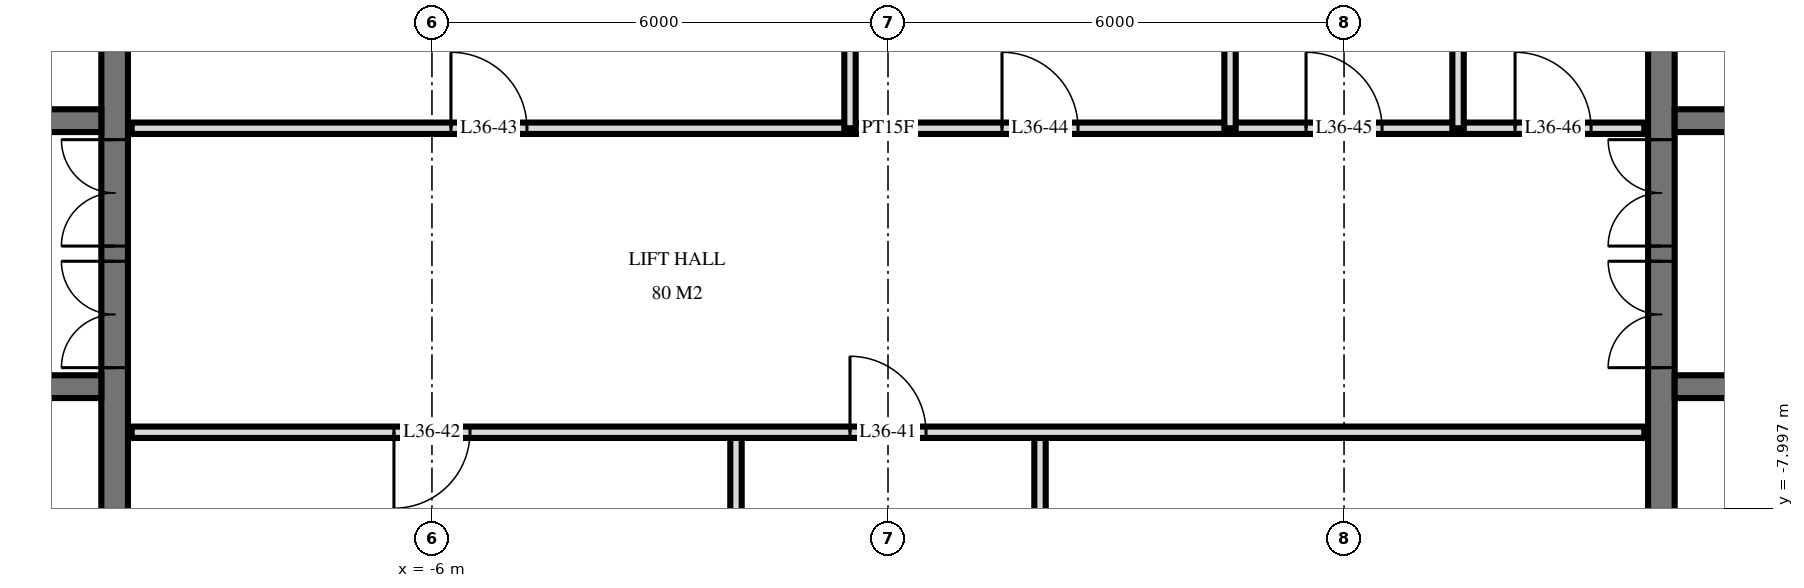
"""IFC4 building model, lengths in metres.
Left out: names, types, materials, properties, quantities, classifications, styles, units other than length and angle.
Written with IfcOpenShell. Run it as: python <this file> out.ifc"""

import sys

from ifc_helpers import new_model, si_unit, direction, frame, frame_2d, origin, place, context, subcontext, project, spatial, rectangle, extrude, element, fill, save


model = new_model("IFC4")
c1 = context("Model", 3, precision=1e-05, world=origin(), true_north=direction((0.0, 1.0)))
c2 = subcontext(c1, "Body", "Model", "MODEL_VIEW")
j1 = project(units=[si_unit("LENGTHUNIT", "METRE"), si_unit("PLANEANGLEUNIT", "RADIAN")], contexts=[c1])
p1 = place(None, origin())
s1 = spatial("IfcSite", under=j1, at=p1, CompositionType="ELEMENT")
p2 = place(p1, origin())
s2 = spatial("IfcBuilding", under=s1, at=p2, CompositionType="ELEMENT")
p3 = place(p2, frame((0.0, 0.0, 141.6)))
s3 = spatial("IfcBuildingStorey", under=s2, at=p3, CompositionType="ELEMENT", Elevation=141.6)
p4 = place(p3, frame((-10.175, -14.55, 0.0), z_axis=(0.0, 0.0, 1.0), x_axis=(0.0, 1.0, 0.0)))
e1 = element("IfcWall", 1, at=p4, inside=s3, PredefinedType="SHEAR", context=c2, shape_type="SweptSolid", body=[
    extrude(rectangle(XDim=14.1, YDim=0.35, at=frame_2d((7.05, 0.0))), origin(), (0.0, 0.0, 1.0), 3.6),
])
p5 = place(p4, frame((8.4, 0.0, 0.0)))
e2 = element("IfcOpeningElement", 2, at=p5, cuts=e1, PredefinedType="OPENING", context=c2, shape_type="SweptSolid", body=[
    extrude(rectangle(XDim=1.4, YDim=2.4, at=frame_2d((0.7, 1.2))), frame((0.0, 0.185, 0.0), z_axis=(0.0, -1.0, 0.0), x_axis=(1.0, 0.0, 0.0)), (0.0, 0.0, 1.0), 0.37),
])
p6 = place(p4, frame((10.0, 0.0, 0.0)))
e3 = element("IfcOpeningElement", 3, at=p6, cuts=e1, PredefinedType="OPENING", context=c2, shape_type="SweptSolid", body=[
    extrude(rectangle(XDim=1.4, YDim=2.4, at=frame_2d((0.7, 1.2))), frame((0.0, 0.185, 0.0), z_axis=(0.0, -1.0, 0.0), x_axis=(1.0, 0.0, 0.0)), (0.0, 0.0, 1.0), 0.37),
])
p7 = place(p4, frame((4.0, 0.0, 0.0)))
e4 = element("IfcOpeningElement", 4, at=p7, cuts=e1, PredefinedType="OPENING", context=c2, shape_type="SweptSolid", body=[
    extrude(rectangle(XDim=1.2, YDim=2.1, at=frame_2d((0.6, 1.05))), frame((0.0, 0.185, 0.0), z_axis=(0.0, -1.0, 0.0), x_axis=(1.0, 0.0, 0.0)), (0.0, 0.0, 1.0), 0.37),
])
p8 = place(p3, frame((-24.05, -2.9, 0.0), z_axis=(0.0, 0.0, 1.0), x_axis=(1.0, 0.0, 0.0)))
e5 = element("IfcWall", 5, at=p8, inside=s3, PredefinedType="SHEAR", context=c2, shape_type="SweptSolid", body=[
    extrude(rectangle(XDim=13.7, YDim=0.3, at=frame_2d((6.85, 0.0))), origin(), (0.0, 0.0, 1.0), 3.6),
])
p9 = place(p8, frame((0.55, 0.0, 0.0)))
e6 = element("IfcOpeningElement", 6, at=p9, cuts=e5, PredefinedType="OPENING", context=c2, shape_type="SweptSolid", body=[
    extrude(rectangle(XDim=1.1, YDim=2.1, at=frame_2d((0.55, 1.05))), frame((0.0, 0.16, 0.0), z_axis=(0.0, -1.0, 0.0), x_axis=(1.0, 0.0, 0.0)), (0.0, 0.0, 1.0), 0.32),
])
p10 = place(p8, frame((5.9, 0.0, 0.0)))
e7 = element("IfcOpeningElement", 7, at=p10, cuts=e5, PredefinedType="OPENING", context=c2, shape_type="SweptSolid", body=[
    extrude(rectangle(XDim=0.9, YDim=2.1, at=frame_2d((0.45, 1.05))), frame((0.0, 0.16, 0.0), z_axis=(0.0, -1.0, 0.0), x_axis=(1.0, 0.0, 0.0)), (0.0, 0.0, 1.0), 0.32),
])
p11 = place(p8, frame((11.85, 0.0, 0.0)))
e8 = element("IfcOpeningElement", 8, at=p11, cuts=e5, PredefinedType="OPENING", context=c2, shape_type="SweptSolid", body=[
    extrude(rectangle(XDim=1.0, YDim=2.1, at=frame_2d((0.5, 1.05))), frame((0.0, 0.16, 0.0), z_axis=(0.0, -1.0, 0.0), x_axis=(1.0, 0.0, 0.0)), (0.0, 0.0, 1.0), 0.32),
])
p12 = place(p8, frame((8.85, 0.0, 0.0)))
e9 = element("IfcOpeningElement", 9, at=p12, cuts=e5, PredefinedType="OPENING", context=c2, shape_type="SweptSolid", body=[
    extrude(rectangle(XDim=1.0, YDim=2.1, at=frame_2d((0.5, 1.05))), frame((0.0, 0.16, 0.0), z_axis=(0.0, -1.0, 0.0), x_axis=(1.0, 0.0, 0.0)), (0.0, 0.0, 1.0), 0.32),
])
p13 = place(p8, frame((3.0, 0.0, 0.0)))
e10 = element("IfcOpeningElement", 10, at=p13, cuts=e5, PredefinedType="OPENING", context=c2, shape_type="SweptSolid", body=[
    extrude(rectangle(XDim=1.0, YDim=2.1, at=frame_2d((0.5, 1.05))), frame((0.0, 0.16, 0.0), z_axis=(0.0, -1.0, 0.0), x_axis=(1.0, 0.0, 0.0)), (0.0, 0.0, 1.0), 0.32),
])
p14 = place(p3, frame((-24.05, -6.4, 0.0), z_axis=(0.0, 0.0, 1.0), x_axis=(1.0, 0.0, 0.0)))
e11 = element("IfcWall", 11, at=p14, inside=s3, PredefinedType="SHEAR", context=c2, shape_type="SweptSolid", body=[
    extrude(rectangle(XDim=13.7, YDim=0.3, at=frame_2d((6.85, 0.0))), origin(), (0.0, 0.0, 1.0), 3.6),
])
p15 = place(p14, frame((0.55, 0.0, 0.0)))
e12 = element("IfcOpeningElement", 12, at=p15, cuts=e11, PredefinedType="OPENING", context=c2, shape_type="SweptSolid", body=[
    extrude(rectangle(XDim=1.1, YDim=2.1, at=frame_2d((0.55, 1.05))), frame((0.0, 0.16, 0.0), z_axis=(0.0, -1.0, 0.0), x_axis=(1.0, 0.0, 0.0)), (0.0, 0.0, 1.0), 0.32),
])
p16 = place(p14, frame((5.8, 0.0, 0.0)))
e13 = element("IfcOpeningElement", 13, at=p16, cuts=e11, PredefinedType="OPENING", context=c2, shape_type="SweptSolid", body=[
    extrude(rectangle(XDim=1.1, YDim=2.1, at=frame_2d((0.55, 1.05))), frame((0.0, 0.16, 0.0), z_axis=(0.0, -1.0, 0.0), x_axis=(1.0, 0.0, 0.0)), (0.0, 0.0, 1.0), 0.32),
])
p17 = place(p3, frame((10.175, -14.55, 0.0), z_axis=(0.0, 0.0, 1.0), x_axis=(0.0, 1.0, 0.0)))
e14 = element("IfcWall", 14, at=p17, inside=s3, PredefinedType="SHEAR", context=c2, shape_type="SweptSolid", body=[
    extrude(rectangle(XDim=14.1, YDim=0.35, at=frame_2d((7.05, 0.0))), origin(), (0.0, 0.0, 1.0), 3.6),
])
p18 = place(p17, frame((8.4, 0.0, 0.0)))
e15 = element("IfcOpeningElement", 15, at=p18, cuts=e14, PredefinedType="OPENING", context=c2, shape_type="SweptSolid", body=[
    extrude(rectangle(XDim=1.4, YDim=2.4, at=frame_2d((0.7, 1.2))), frame((0.0, 0.185, 0.0), z_axis=(0.0, -1.0, 0.0), x_axis=(1.0, 0.0, 0.0)), (0.0, 0.0, 1.0), 0.37),
])
p19 = place(p17, frame((10.0, 0.0, 0.0)))
e16 = element("IfcOpeningElement", 16, at=p19, cuts=e14, PredefinedType="OPENING", context=c2, shape_type="SweptSolid", body=[
    extrude(rectangle(XDim=1.4, YDim=2.4, at=frame_2d((0.7, 1.2))), frame((0.0, 0.185, 0.0), z_axis=(0.0, -1.0, 0.0), x_axis=(1.0, 0.0, 0.0)), (0.0, 0.0, 1.0), 0.37),
])
p20 = place(p17, frame((4.0, 0.0, 0.0)))
e17 = element("IfcOpeningElement", 17, at=p20, cuts=e14, PredefinedType="OPENING", context=c2, shape_type="SweptSolid", body=[
    extrude(rectangle(XDim=1.2, YDim=2.1, at=frame_2d((0.6, 1.05))), frame((0.0, 0.185, 0.0), z_axis=(0.0, -1.0, 0.0), x_axis=(1.0, 0.0, 0.0)), (0.0, 0.0, 1.0), 0.37),
])
p21 = place(p3, frame((10.35, -2.9, 0.0), z_axis=(0.0, 0.0, 1.0), x_axis=(1.0, 0.0, 0.0)))
e18 = element("IfcWall", 18, at=p21, inside=s3, PredefinedType="SHEAR", context=c2, shape_type="SweptSolid", body=[
    extrude(rectangle(XDim=13.7, YDim=0.3, at=frame_2d((6.85, 0.0))), origin(), (0.0, 0.0, 1.0), 3.6),
])
p22 = place(p21, frame((12.05, 0.0, 0.0)))
e19 = element("IfcOpeningElement", 19, at=p22, cuts=e18, PredefinedType="OPENING", context=c2, shape_type="SweptSolid", body=[
    extrude(rectangle(XDim=1.1, YDim=2.1, at=frame_2d((0.55, 1.05))), frame((0.0, 0.16, 0.0), z_axis=(0.0, -1.0, 0.0), x_axis=(1.0, 0.0, 0.0)), (0.0, 0.0, 1.0), 0.32),
])
p23 = place(p21, frame((6.9, 0.0, 0.0)))
e20 = element("IfcOpeningElement", 20, at=p23, cuts=e18, PredefinedType="OPENING", context=c2, shape_type="SweptSolid", body=[
    extrude(rectangle(XDim=0.9, YDim=2.1, at=frame_2d((0.45, 1.05))), frame((0.0, 0.16, 0.0), z_axis=(0.0, -1.0, 0.0), x_axis=(1.0, 0.0, 0.0)), (0.0, 0.0, 1.0), 0.32),
])
p24 = place(p21, frame((0.85, 0.0, 0.0)))
e21 = element("IfcOpeningElement", 21, at=p24, cuts=e18, PredefinedType="OPENING", context=c2, shape_type="SweptSolid", body=[
    extrude(rectangle(XDim=1.0, YDim=2.1, at=frame_2d((0.5, 1.05))), frame((0.0, 0.16, 0.0), z_axis=(0.0, -1.0, 0.0), x_axis=(1.0, 0.0, 0.0)), (0.0, 0.0, 1.0), 0.32),
])
p25 = place(p21, frame((3.85, 0.0, 0.0)))
e22 = element("IfcOpeningElement", 22, at=p25, cuts=e18, PredefinedType="OPENING", context=c2, shape_type="SweptSolid", body=[
    extrude(rectangle(XDim=1.0, YDim=2.1, at=frame_2d((0.5, 1.05))), frame((0.0, 0.16, 0.0), z_axis=(0.0, -1.0, 0.0), x_axis=(1.0, 0.0, 0.0)), (0.0, 0.0, 1.0), 0.32),
])
p26 = place(p21, frame((9.7, 0.0, 0.0)))
e23 = element("IfcOpeningElement", 23, at=p26, cuts=e18, PredefinedType="OPENING", context=c2, shape_type="SweptSolid", body=[
    extrude(rectangle(XDim=1.0, YDim=2.1, at=frame_2d((0.5, 1.05))), frame((0.0, 0.16, 0.0), z_axis=(0.0, -1.0, 0.0), x_axis=(1.0, 0.0, 0.0)), (0.0, 0.0, 1.0), 0.32),
])
p27 = place(p3, frame((10.35, -6.4, 0.0), z_axis=(0.0, 0.0, 1.0), x_axis=(1.0, 0.0, 0.0)))
e24 = element("IfcWall", 24, at=p27, inside=s3, PredefinedType="SHEAR", context=c2, shape_type="SweptSolid", body=[
    extrude(rectangle(XDim=13.7, YDim=0.3, at=frame_2d((6.85, 0.0))), origin(), (0.0, 0.0, 1.0), 3.6),
])
p28 = place(p27, frame((12.05, 0.0, 0.0)))
e25 = element("IfcOpeningElement", 25, at=p28, cuts=e24, PredefinedType="OPENING", context=c2, shape_type="SweptSolid", body=[
    extrude(rectangle(XDim=1.1, YDim=2.1, at=frame_2d((0.55, 1.05))), frame((0.0, 0.16, 0.0), z_axis=(0.0, -1.0, 0.0), x_axis=(1.0, 0.0, 0.0)), (0.0, 0.0, 1.0), 0.32),
])
p29 = place(p27, frame((6.8, 0.0, 0.0)))
e26 = element("IfcOpeningElement", 26, at=p29, cuts=e24, PredefinedType="OPENING", context=c2, shape_type="SweptSolid", body=[
    extrude(rectangle(XDim=1.1, YDim=2.1, at=frame_2d((0.55, 1.05))), frame((0.0, 0.16, 0.0), z_axis=(0.0, -1.0, 0.0), x_axis=(1.0, 0.0, 0.0)), (0.0, 0.0, 1.0), 0.32),
])
for number, where, z_axis, x_axis in (
    (27, (7.5, -3.0, 0.0), (0.0, 0.0, 1.0), (0.0, 1.0, 0.0)),
    (28, (4.5, -3.0, 0.0), (0.0, 0.0, 1.0), (0.0, 1.0, 0.0)),
):
    element("IfcWall", number, at=place(p3, frame(where, z_axis=z_axis, x_axis=x_axis)), inside=s3, PredefinedType="PLUMBINGWALL", context=c2, shape_type="SweptSolid", body=[
        extrude(rectangle(XDim=4.02, YDim=0.15, at=frame_2d((2.01, 0.0))), origin(), (0.0, 0.0, 1.0), 3.32),
    ])
p30 = place(p3, frame((2.0, -11.0, 0.0), z_axis=(0.0, 0.0, 1.0), x_axis=(0.0, 1.0, 0.0)))
e29 = element("IfcWall", 29, at=p30, inside=s3, PredefinedType="PARTITIONING", context=c2, shape_type="SweptSolid", body=[
    extrude(rectangle(XDim=4.0, YDim=0.15, at=frame_2d((2.0, 0.0))), origin(), (0.0, 0.0, 1.0), 3.32),
])
p31 = place(p3, frame((-0.5, -3.0, 0.0), z_axis=(0.0, 0.0, 1.0), x_axis=(0.0, 1.0, 0.0)))
e30 = element("IfcWall", 30, at=p31, inside=s3, PredefinedType="PARTITIONING", context=c2, shape_type="SweptSolid", body=[
    extrude(rectangle(XDim=4.02, YDim=0.15, at=frame_2d((2.01, 0.0))), origin(), (0.0, 0.0, 1.0), 3.32),
])
p32 = place(p3, frame((-2.0, -11.0, 0.0), z_axis=(0.0, 0.0, 1.0), x_axis=(0.0, 1.0, 0.0)))
e31 = element("IfcWall", 31, at=p32, inside=s3, PredefinedType="PARTITIONING", context=c2, shape_type="SweptSolid", body=[
    extrude(rectangle(XDim=4.0, YDim=0.15, at=frame_2d((2.0, 0.0))), origin(), (0.0, 0.0, 1.0), 3.32),
])
p33 = place(p3, frame((-9.95, -7.0, 0.0), z_axis=(0.0, 0.0, 1.0), x_axis=(1.0, 0.0, 0.0)))
e32 = element("IfcWall", 32, at=p33, inside=s3, PredefinedType="PARTITIONING", context=c2, shape_type="SweptSolid", body=[
    extrude(rectangle(XDim=19.9, YDim=0.15, at=frame_2d((9.95, 0.0))), origin(), (0.0, 0.0, 1.0), 3.32),
])
p34 = place(p33, frame((9.45, 0.0, 0.0)))
e33 = element("IfcOpeningElement", 33, at=p34, cuts=e32, PredefinedType="OPENING", context=c2, shape_type="SweptSolid", body=[
    extrude(rectangle(XDim=1.0, YDim=2.1, at=frame_2d((0.5, 1.05))), frame((0.0, 0.085, 0.0), z_axis=(0.0, -1.0, 0.0), x_axis=(1.0, 0.0, 0.0)), (0.0, 0.0, 1.0), 0.17),
])
p35 = place(p33, frame((3.45, 0.0, 0.0)))
e34 = element("IfcOpeningElement", 34, at=p35, cuts=e32, PredefinedType="OPENING", context=c2, shape_type="SweptSolid", body=[
    extrude(rectangle(XDim=1.0, YDim=2.1, at=frame_2d((0.5, 1.05))), frame((0.0, 0.085, 0.0), z_axis=(0.0, -1.0, 0.0), x_axis=(1.0, 0.0, 0.0)), (0.0, 0.0, 1.0), 0.17),
])
p36 = place(p3, frame((-9.95, -3.0, 0.0), z_axis=(0.0, 0.0, 1.0), x_axis=(1.0, 0.0, 0.0)))
e35 = element("IfcWall", 35, at=p36, inside=s3, PredefinedType="PARTITIONING", context=c2, shape_type="SweptSolid", body=[
    extrude(rectangle(XDim=19.9, YDim=0.15, at=frame_2d((9.95, 0.0))), origin(), (0.0, 0.0, 1.0), 3.32),
])
p37 = place(p36, frame((4.2, 0.0, 0.0)))
e36 = element("IfcOpeningElement", 36, at=p37, cuts=e35, PredefinedType="OPENING", context=c2, shape_type="SweptSolid", body=[
    extrude(rectangle(XDim=1.0, YDim=2.1, at=frame_2d((0.5, 1.05))), frame((0.0, 0.085, 0.0), z_axis=(0.0, -1.0, 0.0), x_axis=(1.0, 0.0, 0.0)), (0.0, 0.0, 1.0), 0.17),
])
p38 = place(p36, frame((11.45, 0.0, 0.0)))
e37 = element("IfcOpeningElement", 37, at=p38, cuts=e35, PredefinedType="OPENING", context=c2, shape_type="SweptSolid", body=[
    extrude(rectangle(XDim=1.0, YDim=2.1, at=frame_2d((0.5, 1.05))), frame((0.0, 0.085, 0.0), z_axis=(0.0, -1.0, 0.0), x_axis=(1.0, 0.0, 0.0)), (0.0, 0.0, 1.0), 0.17),
])
p39 = place(p36, frame((15.45, 0.0, 0.0)))
e38 = element("IfcOpeningElement", 38, at=p39, cuts=e35, PredefinedType="OPENING", context=c2, shape_type="SweptSolid", body=[
    extrude(rectangle(XDim=1.0, YDim=2.1, at=frame_2d((0.5, 1.05))), frame((0.0, 0.085, 0.0), z_axis=(0.0, -1.0, 0.0), x_axis=(1.0, 0.0, 0.0)), (0.0, 0.0, 1.0), 0.17),
])
p40 = place(p36, frame((18.2, 0.0, 0.0)))
e39 = element("IfcOpeningElement", 39, at=p40, cuts=e35, PredefinedType="OPENING", context=c2, shape_type="SweptSolid", body=[
    extrude(rectangle(XDim=1.0, YDim=2.1, at=frame_2d((0.5, 1.05))), frame((0.0, 0.085, 0.0), z_axis=(0.0, -1.0, 0.0), x_axis=(1.0, 0.0, 0.0)), (0.0, 0.0, 1.0), 0.17),
])
p41 = place(p5, origin())
e40 = element("IfcDoor", 40, at=p41, inside=s3, OperationType="DOUBLE_DOOR_SINGLE_SWING", PredefinedType="DOOR", context=c2, shape_type="SweptSolid", body=[
    extrude(rectangle(XDim=1.4, YDim=2.4, at=frame_2d((0.7, 1.2))), frame((0.0, 0.025, 0.0), z_axis=(0.0, -1.0, 0.0), x_axis=(1.0, 0.0, 0.0)), (0.0, 0.0, 1.0), 0.05),
])
fill(e2, e40)
p42 = place(p6, origin())
e41 = element("IfcDoor", 41, at=p42, inside=s3, OperationType="DOUBLE_DOOR_SINGLE_SWING", PredefinedType="DOOR", context=c2, shape_type="SweptSolid", body=[
    extrude(rectangle(XDim=1.4, YDim=2.4, at=frame_2d((0.7, 1.2))), frame((0.0, 0.025, 0.0), z_axis=(0.0, -1.0, 0.0), x_axis=(1.0, 0.0, 0.0)), (0.0, 0.0, 1.0), 0.05),
])
fill(e3, e41)
p43 = place(p18, origin())
e42 = element("IfcDoor", 42, at=p43, inside=s3, OperationType="DOUBLE_DOOR_SINGLE_SWING", PredefinedType="DOOR", context=c2, shape_type="SweptSolid", body=[
    extrude(rectangle(XDim=1.4, YDim=2.4, at=frame_2d((0.7, 1.2))), frame((0.0, 0.025, 0.0), z_axis=(0.0, -1.0, 0.0), x_axis=(1.0, 0.0, 0.0)), (0.0, 0.0, 1.0), 0.05),
])
fill(e15, e42)
p44 = place(p19, origin())
e43 = element("IfcDoor", 43, at=p44, inside=s3, OperationType="DOUBLE_DOOR_SINGLE_SWING", PredefinedType="DOOR", context=c2, shape_type="SweptSolid", body=[
    extrude(rectangle(XDim=1.4, YDim=2.4, at=frame_2d((0.7, 1.2))), frame((0.0, 0.025, 0.0), z_axis=(0.0, -1.0, 0.0), x_axis=(1.0, 0.0, 0.0)), (0.0, 0.0, 1.0), 0.05),
])
fill(e16, e43)
p45 = place(p34, origin())
e44 = element("IfcDoor", 44, at=p45, inside=s3, OperationType="SINGLE_SWING_RIGHT", PredefinedType="DOOR", context=c2, shape_type="SweptSolid", body=[
    extrude(rectangle(XDim=1.0, YDim=2.1, at=frame_2d((0.5, 1.05))), frame((0.0, 0.025, 0.0), z_axis=(0.0, -1.0, 0.0), x_axis=(1.0, 0.0, 0.0)), (0.0, 0.0, 1.0), 0.05),
])
fill(e33, e44)
p46 = place(p35, frame((0.5, 0.0, 0.0), z_axis=(0.0, 0.0, 1.0), x_axis=(-1.0, 0.0, 0.0)))
e45 = element("IfcDoor", 45, at=p46, inside=s3, OperationType="SINGLE_SWING_LEFT", PredefinedType="DOOR", context=c2, shape_type="SweptSolid", body=[
    extrude(rectangle(XDim=1.0, YDim=2.1, at=frame_2d((0.0, 1.05))), frame((0.0, -0.025, 0.0), z_axis=(0.0, 1.0, 0.0), x_axis=(-1.0, 0.0, 0.0)), (0.0, 0.0, 1.0), 0.05),
])
fill(e34, e45)
p47 = place(p37, origin())
e46 = element("IfcDoor", 46, at=p47, inside=s3, OperationType="SINGLE_SWING_RIGHT", PredefinedType="DOOR", context=c2, shape_type="SweptSolid", body=[
    extrude(rectangle(XDim=1.0, YDim=2.1, at=frame_2d((0.5, 1.05))), frame((0.0, 0.025, 0.0), z_axis=(0.0, -1.0, 0.0), x_axis=(1.0, 0.0, 0.0)), (0.0, 0.0, 1.0), 0.05),
])
fill(e36, e46)
p48 = place(p38, origin())
e47 = element("IfcDoor", 47, at=p48, inside=s3, OperationType="SINGLE_SWING_RIGHT", PredefinedType="DOOR", context=c2, shape_type="SweptSolid", body=[
    extrude(rectangle(XDim=1.0, YDim=2.1, at=frame_2d((0.5, 1.05))), frame((0.0, 0.025, 0.0), z_axis=(0.0, -1.0, 0.0), x_axis=(1.0, 0.0, 0.0)), (0.0, 0.0, 1.0), 0.05),
])
fill(e37, e47)
p49 = place(p39, origin())
e48 = element("IfcDoor", 48, at=p49, inside=s3, OperationType="SINGLE_SWING_RIGHT", PredefinedType="DOOR", context=c2, shape_type="SweptSolid", body=[
    extrude(rectangle(XDim=1.0, YDim=2.1, at=frame_2d((0.5, 1.05))), frame((0.0, 0.025, 0.0), z_axis=(0.0, -1.0, 0.0), x_axis=(1.0, 0.0, 0.0)), (0.0, 0.0, 1.0), 0.05),
])
fill(e38, e48)
p50 = place(p40, origin())
e49 = element("IfcDoor", 49, at=p50, inside=s3, OperationType="SINGLE_SWING_RIGHT", PredefinedType="DOOR", context=c2, shape_type="SweptSolid", body=[
    extrude(rectangle(XDim=1.0, YDim=2.1, at=frame_2d((0.5, 1.05))), frame((0.0, 0.025, 0.0), z_axis=(0.0, -1.0, 0.0), x_axis=(1.0, 0.0, 0.0)), (0.0, 0.0, 1.0), 0.05),
])
fill(e39, e49)
save(model, sys.argv[1])
